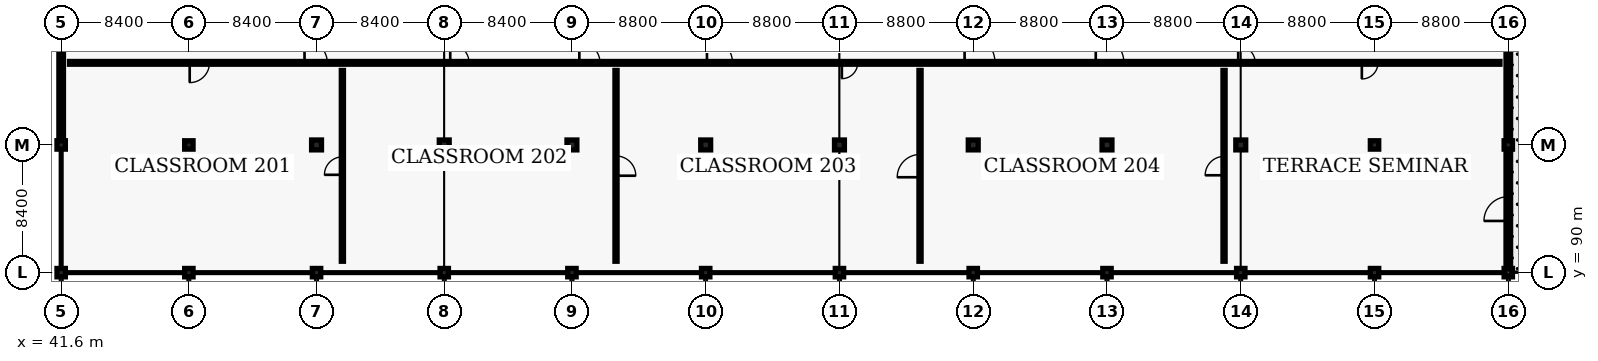
"""IFC4 building model, lengths in metres.
Left out: names, types, materials, properties, quantities, classifications, styles, units other than length and angle.
Written with IfcOpenShell. Run it as: python <this file> out.ifc"""

import sys

from ifc_helpers import new_model, si_unit, direction, frame, frame_2d, origin, origin_2d, place, context, subcontext, project, spatial, rectangle, extrude, element, fill, save


model = new_model("IFC4")
c1 = context("Model", 3, precision=1e-05, world=origin(), true_north=direction((0.0, 1.0)))
c2 = subcontext(c1, "Body", "Model", "MODEL_VIEW")
j1 = project(units=[si_unit("LENGTHUNIT", "METRE"), si_unit("PLANEANGLEUNIT", "RADIAN")], contexts=[c1])
p1 = place(None, origin())
s1 = spatial("IfcSite", under=j1, at=p1, CompositionType="ELEMENT")
p2 = place(p1, origin())
s2 = spatial("IfcBuilding", under=s1, at=p2, CompositionType="ELEMENT")
p3 = place(p2, frame((0.0, 0.0, 9.0)))
s3 = spatial("IfcBuildingStorey", under=s2, at=p3, CompositionType="ELEMENT", Elevation=9.0)
for number, where, z_axis, x_axis in (
    (1, (41.6, 90.0, 0.0), (0.0, 0.0, 1.0), (1.0, 0.0, 0.0)),
    (2, (41.6, 98.4, 0.0), (0.0, 0.0, 1.0), (1.0, 0.0, 0.0)),
    (3, (50.0, 90.0, 0.0), (0.0, 0.0, 1.0), (1.0, 0.0, 0.0)),
    (4, (50.0, 98.4, 0.0), (0.0, 0.0, 1.0), (1.0, 0.0, 0.0)),
    (5, (58.4, 90.0, 0.0), (0.0, 0.0, 1.0), (1.0, 0.0, 0.0)),
):
    element("IfcColumn", number, at=place(p3, frame(where, z_axis=z_axis, x_axis=x_axis)), inside=s3, PredefinedType="COLUMN", context=c2, shape_type="SweptSolid", body=[
        extrude(rectangle(XDim=0.55, YDim=0.55, at=origin_2d()), origin(), (0.0, 0.0, 1.0), 3.9),
    ])
p4 = place(p3, frame((58.4, 98.4, 0.0), z_axis=(0.0, 0.0, 1.0), x_axis=(1.0, 0.0, 0.0)))
e6 = element("IfcColumn", 6, at=p4, inside=s3, PredefinedType="COLUMN", context=c2, shape_type="SweptSolid", body=[
    extrude(rectangle(XDim=0.65, YDim=0.65, at=origin_2d()), origin(), (0.0, 0.0, 1.0), 3.9),
])
p5 = place(p3, frame((66.8, 90.0, 0.0), z_axis=(0.0, 0.0, 1.0), x_axis=(1.0, 0.0, 0.0)))
e7 = element("IfcColumn", 7, at=p5, inside=s3, PredefinedType="COLUMN", context=c2, shape_type="SweptSolid", body=[
    extrude(rectangle(XDim=0.55, YDim=0.55, at=origin_2d()), origin(), (0.0, 0.0, 1.0), 3.9),
])
p6 = place(p3, frame((66.8, 98.4, 0.0), z_axis=(0.0, 0.0, 1.0), x_axis=(1.0, 0.0, 0.0)))
e8 = element("IfcColumn", 8, at=p6, inside=s3, PredefinedType="COLUMN", context=c2, shape_type="SweptSolid", body=[
    extrude(rectangle(XDim=0.65, YDim=0.65, at=origin_2d()), origin(), (0.0, 0.0, 1.0), 3.9),
])
p7 = place(p3, frame((75.2, 90.0, 0.0), z_axis=(0.0, 0.0, 1.0), x_axis=(1.0, 0.0, 0.0)))
e9 = element("IfcColumn", 9, at=p7, inside=s3, PredefinedType="COLUMN", context=c2, shape_type="SweptSolid", body=[
    extrude(rectangle(XDim=0.55, YDim=0.55, at=origin_2d()), origin(), (0.0, 0.0, 1.0), 3.9),
])
p8 = place(p3, frame((75.2, 98.4, 0.0), z_axis=(0.0, 0.0, 1.0), x_axis=(1.0, 0.0, 0.0)))
e10 = element("IfcColumn", 10, at=p8, inside=s3, PredefinedType="COLUMN", context=c2, shape_type="SweptSolid", body=[
    extrude(rectangle(XDim=0.65, YDim=0.65, at=origin_2d()), origin(), (0.0, 0.0, 1.0), 3.9),
])
p9 = place(p3, frame((84.0, 90.0, 0.0), z_axis=(0.0, 0.0, 1.0), x_axis=(1.0, 0.0, 0.0)))
e11 = element("IfcColumn", 11, at=p9, inside=s3, PredefinedType="COLUMN", context=c2, shape_type="SweptSolid", body=[
    extrude(rectangle(XDim=0.55, YDim=0.55, at=origin_2d()), origin(), (0.0, 0.0, 1.0), 3.9),
])
p10 = place(p3, frame((84.0, 98.4, 0.0), z_axis=(0.0, 0.0, 1.0), x_axis=(1.0, 0.0, 0.0)))
e12 = element("IfcColumn", 12, at=p10, inside=s3, PredefinedType="COLUMN", context=c2, shape_type="SweptSolid", body=[
    extrude(rectangle(XDim=0.65, YDim=0.65, at=origin_2d()), origin(), (0.0, 0.0, 1.0), 3.9),
])
p11 = place(p3, frame((92.8, 90.0, 0.0), z_axis=(0.0, 0.0, 1.0), x_axis=(1.0, 0.0, 0.0)))
e13 = element("IfcColumn", 13, at=p11, inside=s3, PredefinedType="COLUMN", context=c2, shape_type="SweptSolid", body=[
    extrude(rectangle(XDim=0.55, YDim=0.55, at=origin_2d()), origin(), (0.0, 0.0, 1.0), 3.9),
])
p12 = place(p3, frame((92.8, 98.4, 0.0), z_axis=(0.0, 0.0, 1.0), x_axis=(1.0, 0.0, 0.0)))
e14 = element("IfcColumn", 14, at=p12, inside=s3, PredefinedType="COLUMN", context=c2, shape_type="SweptSolid", body=[
    extrude(rectangle(XDim=0.65, YDim=0.65, at=origin_2d()), origin(), (0.0, 0.0, 1.0), 3.9),
])
p13 = place(p3, frame((101.6, 90.0, 0.0), z_axis=(0.0, 0.0, 1.0), x_axis=(1.0, 0.0, 0.0)))
e15 = element("IfcColumn", 15, at=p13, inside=s3, PredefinedType="COLUMN", context=c2, shape_type="SweptSolid", body=[
    extrude(rectangle(XDim=0.55, YDim=0.55, at=origin_2d()), origin(), (0.0, 0.0, 1.0), 3.9),
])
p14 = place(p3, frame((101.6, 98.4, 0.0), z_axis=(0.0, 0.0, 1.0), x_axis=(1.0, 0.0, 0.0)))
e16 = element("IfcColumn", 16, at=p14, inside=s3, PredefinedType="COLUMN", context=c2, shape_type="SweptSolid", body=[
    extrude(rectangle(XDim=0.65, YDim=0.65, at=origin_2d()), origin(), (0.0, 0.0, 1.0), 3.9),
])
p15 = place(p3, frame((110.4, 90.0, 0.0), z_axis=(0.0, 0.0, 1.0), x_axis=(1.0, 0.0, 0.0)))
e17 = element("IfcColumn", 17, at=p15, inside=s3, PredefinedType="COLUMN", context=c2, shape_type="SweptSolid", body=[
    extrude(rectangle(XDim=0.55, YDim=0.55, at=origin_2d()), origin(), (0.0, 0.0, 1.0), 3.9),
])
p16 = place(p3, frame((110.4, 98.4, 0.0), z_axis=(0.0, 0.0, 1.0), x_axis=(1.0, 0.0, 0.0)))
e18 = element("IfcColumn", 18, at=p16, inside=s3, PredefinedType="COLUMN", context=c2, shape_type="SweptSolid", body=[
    extrude(rectangle(XDim=0.65, YDim=0.65, at=origin_2d()), origin(), (0.0, 0.0, 1.0), 3.9),
])
p17 = place(p3, frame((119.2, 90.0, 0.0), z_axis=(0.0, 0.0, 1.0), x_axis=(1.0, 0.0, 0.0)))
e19 = element("IfcColumn", 19, at=p17, inside=s3, PredefinedType="COLUMN", context=c2, shape_type="SweptSolid", body=[
    extrude(rectangle(XDim=0.55, YDim=0.55, at=origin_2d()), origin(), (0.0, 0.0, 1.0), 3.9),
])
p18 = place(p3, frame((119.2, 98.4, 0.0), z_axis=(0.0, 0.0, 1.0), x_axis=(1.0, 0.0, 0.0)))
e20 = element("IfcColumn", 20, at=p18, inside=s3, PredefinedType="COLUMN", context=c2, shape_type="SweptSolid", body=[
    extrude(rectangle(XDim=0.65, YDim=0.65, at=origin_2d()), origin(), (0.0, 0.0, 1.0), 3.9),
])
for number, where, z_axis, x_axis in (
    (21, (128.0, 90.0, 0.0), (0.0, 0.0, 1.0), (1.0, 0.0, 0.0)),
    (22, (128.0, 98.4, 0.0), (0.0, 0.0, 1.0), (1.0, 0.0, 0.0)),
    (23, (136.8, 90.0, 0.0), (0.0, 0.0, 1.0), (1.0, 0.0, 0.0)),
    (24, (136.8, 98.4, 0.0), (0.0, 0.0, 1.0), (1.0, 0.0, 0.0)),
):
    element("IfcColumn", number, at=place(p3, frame(where, z_axis=z_axis, x_axis=x_axis)), inside=s3, PredefinedType="COLUMN", context=c2, shape_type="SweptSolid", body=[
        extrude(rectangle(XDim=0.55, YDim=0.55, at=origin_2d()), origin(), (0.0, 0.0, 1.0), 3.9),
    ])
p19 = place(p3, frame((41.6, 98.5, 0.0), z_axis=(0.0, 0.0, 1.0), x_axis=(0.0, 1.0, 0.0)))
e25 = element("IfcWall", 25, at=p19, inside=s3, PredefinedType="SOLIDWALL", context=c2, shape_type="SweptSolid", body=[
    extrude(rectangle(XDim=8.2, YDim=0.3, at=frame_2d((4.1, 0.0))), origin(), (0.0, 0.0, 1.0), 3.195),
])
p20 = place(p19, frame((3.3, 0.0, 0.875)))
e26 = element("IfcOpeningElement", 26, at=p20, cuts=e25, PredefinedType="OPENING", context=c2, shape_type="SweptSolid", body=[
    extrude(rectangle(XDim=1.6, YDim=2.1, at=frame_2d((0.8, 1.05))), frame((0.0, 0.16, 0.0), z_axis=(0.0, -1.0, 0.0), x_axis=(1.0, 0.0, 0.0)), (0.0, 0.0, 1.0), 0.32),
])
p21 = place(p3, frame((136.8, 90.1, 0.0), z_axis=(0.0, 0.0, 1.0), x_axis=(0.0, 1.0, 0.0)))
e27 = element("IfcWall", 27, at=p21, inside=s3, PredefinedType="SOLIDWALL", context=c2, shape_type="SweptSolid", body=[
    extrude(rectangle(XDim=8.2, YDim=0.3, at=frame_2d((4.1, 0.0))), origin(), (0.0, 0.0, 1.0), 3.195),
])
p22 = place(p21, frame((3.3, 0.0, 0.0)))
e28 = element("IfcOpeningElement", 28, at=p22, cuts=e27, PredefinedType="OPENING", context=c2, shape_type="SweptSolid", body=[
    extrude(rectangle(XDim=1.6, YDim=2.2, at=frame_2d((0.8, 1.1))), frame((0.0, 0.16, 0.0), z_axis=(0.0, -1.0, 0.0), x_axis=(1.0, 0.0, 0.0)), (0.0, 0.0, 1.0), 0.32),
])
p23 = place(p3, frame((136.8, 98.5, 0.0), z_axis=(0.0, 0.0, 1.0), x_axis=(0.0, 1.0, 0.0)))
e29 = element("IfcWall", 29, at=p23, inside=s3, PredefinedType="SOLIDWALL", context=c2, shape_type="SweptSolid", body=[
    extrude(rectangle(XDim=8.2, YDim=0.3, at=frame_2d((4.1, 0.0))), origin(), (0.0, 0.0, 1.0), 3.195),
])
p24 = place(p3, frame((42.15, 103.8, 0.0), z_axis=(0.0, 0.0, 1.0), x_axis=(1.0, 0.0, 0.0)))
e30 = element("IfcWall", 30, at=p24, inside=s3, PredefinedType="PARTITIONING", context=c2, shape_type="SweptSolid", body=[
    extrude(rectangle(XDim=94.1, YDim=0.18, at=frame_2d((47.05, 0.0))), origin(), (0.0, 0.0, 1.0), 2.895),
])
p25 = place(p24, frame((7.905, 0.0, 0.0)))
e31 = element("IfcOpeningElement", 31, at=p25, cuts=e30, PredefinedType="OPENING", context=c2, shape_type="SweptSolid", body=[
    extrude(rectangle(XDim=1.3, YDim=2.2, at=frame_2d((0.65, 1.1))), frame((0.0, 0.1, 0.0), z_axis=(0.0, -1.0, 0.0), x_axis=(1.0, 0.0, 0.0)), (0.0, 0.0, 1.0), 0.2),
])
p26 = place(p24, frame((15.459, 0.0, 0.0)))
e32 = element("IfcOpeningElement", 32, at=p26, cuts=e30, PredefinedType="OPENING", context=c2, shape_type="SweptSolid", body=[
    extrude(rectangle(XDim=1.5, YDim=2.25, at=frame_2d((0.75, 1.125))), frame((0.0, 0.1, 0.0), z_axis=(0.0, -1.0, 0.0), x_axis=(1.0, 0.0, 0.0)), (0.0, 0.0, 1.0), 0.2),
])
p27 = place(p24, frame((25.044, 0.0, 0.0)))
e33 = element("IfcOpeningElement", 33, at=p27, cuts=e30, PredefinedType="OPENING", context=c2, shape_type="SweptSolid", body=[
    extrude(rectangle(XDim=1.24, YDim=2.2, at=frame_2d((0.62, 1.1))), frame((0.0, 0.1, 0.0), z_axis=(0.0, -1.0, 0.0), x_axis=(1.0, 0.0, 0.0)), (0.0, 0.0, 1.0), 0.2),
])
p28 = place(p24, frame((33.538, 0.0, 0.0)))
e34 = element("IfcOpeningElement", 34, at=p28, cuts=e30, PredefinedType="OPENING", context=c2, shape_type="SweptSolid", body=[
    extrude(rectangle(XDim=1.36, YDim=2.22, at=frame_2d((0.68, 1.11))), frame((0.0, 0.1, 0.0), z_axis=(0.0, -1.0, 0.0), x_axis=(1.0, 0.0, 0.0)), (0.0, 0.0, 1.0), 0.2),
])
p29 = place(p24, frame((41.933, 0.0, 0.0)))
e35 = element("IfcOpeningElement", 35, at=p29, cuts=e30, PredefinedType="OPENING", context=c2, shape_type="SweptSolid", body=[
    extrude(rectangle(XDim=1.68, YDim=2.26, at=frame_2d((0.84, 1.13))), frame((0.0, 0.1, 0.0), z_axis=(0.0, -1.0, 0.0), x_axis=(1.0, 0.0, 0.0)), (0.0, 0.0, 1.0), 0.2),
])
p30 = place(p24, frame((50.807, 0.0, 0.0)))
e36 = element("IfcOpeningElement", 36, at=p30, cuts=e30, PredefinedType="OPENING", context=c2, shape_type="SweptSolid", body=[
    extrude(rectangle(XDim=1.04, YDim=2.08, at=frame_2d((0.52, 1.04))), frame((0.0, 0.1, 0.0), z_axis=(0.0, -1.0, 0.0), x_axis=(1.0, 0.0, 0.0)), (0.0, 0.0, 1.0), 0.2),
])
p31 = place(p24, frame((58.882, 0.0, 0.0)))
e37 = element("IfcOpeningElement", 37, at=p31, cuts=e30, PredefinedType="OPENING", context=c2, shape_type="SweptSolid", body=[
    extrude(rectangle(XDim=2.0, YDim=2.3, at=frame_2d((1.0, 1.15))), frame((0.0, 0.1, 0.0), z_axis=(0.0, -1.0, 0.0), x_axis=(1.0, 0.0, 0.0)), (0.0, 0.0, 1.0), 0.2),
])
p32 = place(p24, frame((67.511, 0.0, 0.0)))
e38 = element("IfcOpeningElement", 38, at=p32, cuts=e30, PredefinedType="OPENING", context=c2, shape_type="SweptSolid", body=[
    extrude(rectangle(XDim=1.85, YDim=2.22, at=frame_2d((0.925, 1.11))), frame((0.0, 0.1, 0.0), z_axis=(0.0, -1.0, 0.0), x_axis=(1.0, 0.0, 0.0)), (0.0, 0.0, 1.0), 0.2),
])
p33 = place(p24, frame((76.881, 0.0, 0.0)))
e39 = element("IfcOpeningElement", 39, at=p33, cuts=e30, PredefinedType="OPENING", context=c2, shape_type="SweptSolid", body=[
    extrude(rectangle(XDim=1.12, YDim=2.16, at=frame_2d((0.56, 1.08))), frame((0.0, 0.1, 0.0), z_axis=(0.0, -1.0, 0.0), x_axis=(1.0, 0.0, 0.0)), (0.0, 0.0, 1.0), 0.2),
])
p34 = place(p24, frame((85.015, 0.0, 0.0)))
e40 = element("IfcOpeningElement", 40, at=p34, cuts=e30, PredefinedType="OPENING", context=c2, shape_type="SweptSolid", body=[
    extrude(rectangle(XDim=1.06, YDim=2.16, at=frame_2d((0.53, 1.08))), frame((0.0, 0.1, 0.0), z_axis=(0.0, -1.0, 0.0), x_axis=(1.0, 0.0, 0.0)), (0.0, 0.0, 1.0), 0.2),
])
p35 = place(p3, frame((60.1, 90.75, 0.0), z_axis=(0.0, 0.0, 1.0), x_axis=(0.0, 1.0, 0.0)))
e41 = element("IfcWall", 41, at=p35, inside=s3, PredefinedType="PARTITIONING", context=c2, shape_type="SweptSolid", body=[
    extrude(rectangle(XDim=12.55, YDim=0.14, at=frame_2d((6.275, 0.0))), origin(), (0.0, 0.0, 1.0), 2.845),
])
p36 = place(p35, frame((5.685, 0.0, 0.0)))
e42 = element("IfcOpeningElement", 42, at=p36, cuts=e41, PredefinedType="OPENING", context=c2, shape_type="SweptSolid", body=[
    extrude(rectangle(XDim=1.18, YDim=2.18, at=frame_2d((0.59, 1.09))), frame((0.0, 0.08, 0.0), z_axis=(0.0, -1.0, 0.0), x_axis=(1.0, 0.0, 0.0)), (0.0, 0.0, 1.0), 0.16),
])
p37 = place(p3, frame((78.1, 90.75, 0.0), z_axis=(0.0, 0.0, 1.0), x_axis=(0.0, 1.0, 0.0)))
e43 = element("IfcWall", 43, at=p37, inside=s3, PredefinedType="PARTITIONING", context=c2, shape_type="SweptSolid", body=[
    extrude(rectangle(XDim=12.55, YDim=0.14, at=frame_2d((6.275, 0.0))), origin(), (0.0, 0.0, 1.0), 2.845),
])
p38 = place(p37, frame((5.625, 0.0, 0.0)))
e44 = element("IfcOpeningElement", 44, at=p38, cuts=e43, PredefinedType="OPENING", context=c2, shape_type="SweptSolid", body=[
    extrude(rectangle(XDim=1.3, YDim=2.2, at=frame_2d((0.65, 1.1))), frame((0.0, 0.08, 0.0), z_axis=(0.0, -1.0, 0.0), x_axis=(1.0, 0.0, 0.0)), (0.0, 0.0, 1.0), 0.16),
])
p39 = place(p3, frame((98.1, 90.75, 0.0), z_axis=(0.0, 0.0, 1.0), x_axis=(0.0, 1.0, 0.0)))
e45 = element("IfcWall", 45, at=p39, inside=s3, PredefinedType="PARTITIONING", context=c2, shape_type="SweptSolid", body=[
    extrude(rectangle(XDim=12.55, YDim=0.14, at=frame_2d((6.275, 0.0))), origin(), (0.0, 0.0, 1.0), 2.845),
])
p40 = place(p39, frame((5.525, 0.0, 0.0)))
e46 = element("IfcOpeningElement", 46, at=p40, cuts=e45, PredefinedType="OPENING", context=c2, shape_type="SweptSolid", body=[
    extrude(rectangle(XDim=1.5, YDim=2.25, at=frame_2d((0.75, 1.125))), frame((0.0, 0.08, 0.0), z_axis=(0.0, -1.0, 0.0), x_axis=(1.0, 0.0, 0.0)), (0.0, 0.0, 1.0), 0.16),
])
p41 = place(p3, frame((118.1, 90.75, 0.0), z_axis=(0.0, 0.0, 1.0), x_axis=(0.0, 1.0, 0.0)))
e47 = element("IfcWall", 47, at=p41, inside=s3, PredefinedType="PARTITIONING", context=c2, shape_type="SweptSolid", body=[
    extrude(rectangle(XDim=12.55, YDim=0.14, at=frame_2d((6.275, 0.0))), origin(), (0.0, 0.0, 1.0), 2.845),
])
p42 = place(p41, frame((5.655, 0.0, 0.0)))
e48 = element("IfcOpeningElement", 48, at=p42, cuts=e47, PredefinedType="OPENING", context=c2, shape_type="SweptSolid", body=[
    extrude(rectangle(XDim=1.24, YDim=2.2, at=frame_2d((0.62, 1.1))), frame((0.0, 0.08, 0.0), z_axis=(0.0, -1.0, 0.0), x_axis=(1.0, 0.0, 0.0)), (0.0, 0.0, 1.0), 0.16),
])
p43 = place(p20, origin())
e49 = element("IfcWindow", 49, at=p43, inside=s3, PartitioningType="SINGLE_PANEL", PredefinedType="WINDOW", context=c2, shape_type="SweptSolid", body=[
    extrude(rectangle(XDim=1.6, YDim=2.1, at=frame_2d((0.8, 1.05))), frame((0.0, 0.03, 0.0), z_axis=(0.0, -1.0, 0.0), x_axis=(1.0, 0.0, 0.0)), (0.0, 0.0, 1.0), 0.06),
])
fill(e26, e49)
p44 = place(p22, origin())
e50 = element("IfcDoor", 50, at=p44, inside=s3, OperationType="DOUBLE_DOOR_SINGLE_SWING", PredefinedType="DOOR", context=c2, shape_type="SweptSolid", body=[
    extrude(rectangle(XDim=1.6, YDim=2.2, at=frame_2d((0.8, 1.1))), frame((0.0, 0.025, 0.0), z_axis=(0.0, -1.0, 0.0), x_axis=(1.0, 0.0, 0.0)), (0.0, 0.0, 1.0), 0.05),
])
fill(e28, e50)
p45 = place(p25, origin())
e51 = element("IfcDoor", 51, at=p45, inside=s3, OperationType="SINGLE_SWING_RIGHT", PredefinedType="DOOR", context=c2, shape_type="SweptSolid", body=[
    extrude(rectangle(XDim=1.3, YDim=2.2, at=frame_2d((0.65, 1.1))), frame((0.0, 0.025, 0.0), z_axis=(0.0, -1.0, 0.0), x_axis=(1.0, 0.0, 0.0)), (0.0, 0.0, 1.0), 0.05),
])
fill(e31, e51)
p46 = place(p26, origin())
e52 = element("IfcDoor", 52, at=p46, inside=s3, OperationType="DOUBLE_DOOR_SINGLE_SWING", PredefinedType="DOOR", context=c2, shape_type="SweptSolid", body=[
    extrude(rectangle(XDim=1.5, YDim=2.25, at=frame_2d((0.75, 1.125))), frame((0.0, 0.025, 0.0), z_axis=(0.0, -1.0, 0.0), x_axis=(1.0, 0.0, 0.0)), (0.0, 0.0, 1.0), 0.05),
])
fill(e32, e52)
p47 = place(p27, origin())
e53 = element("IfcDoor", 53, at=p47, inside=s3, OperationType="SINGLE_SWING_LEFT", PredefinedType="DOOR", context=c2, shape_type="SweptSolid", body=[
    extrude(rectangle(XDim=1.24, YDim=2.2, at=frame_2d((0.62, 1.1))), frame((0.0, 0.025, 0.0), z_axis=(0.0, -1.0, 0.0), x_axis=(1.0, 0.0, 0.0)), (0.0, 0.0, 1.0), 0.05),
])
fill(e33, e53)
p48 = place(p28, origin())
e54 = element("IfcDoor", 54, at=p48, inside=s3, OperationType="DOUBLE_DOOR_SINGLE_SWING", PredefinedType="DOOR", context=c2, shape_type="SweptSolid", body=[
    extrude(rectangle(XDim=1.36, YDim=2.22, at=frame_2d((0.68, 1.11))), frame((0.0, 0.025, 0.0), z_axis=(0.0, -1.0, 0.0), x_axis=(1.0, 0.0, 0.0)), (0.0, 0.0, 1.0), 0.05),
])
fill(e34, e54)
p49 = place(p29, origin())
e55 = element("IfcDoor", 55, at=p49, inside=s3, OperationType="DOUBLE_DOOR_SINGLE_SWING", PredefinedType="DOOR", context=c2, shape_type="SweptSolid", body=[
    extrude(rectangle(XDim=1.68, YDim=2.26, at=frame_2d((0.84, 1.13))), frame((0.0, 0.025, 0.0), z_axis=(0.0, -1.0, 0.0), x_axis=(1.0, 0.0, 0.0)), (0.0, 0.0, 1.0), 0.05),
])
fill(e35, e55)
p50 = place(p30, origin())
e56 = element("IfcDoor", 56, at=p50, inside=s3, OperationType="SINGLE_SWING_RIGHT", PredefinedType="DOOR", context=c2, shape_type="SweptSolid", body=[
    extrude(rectangle(XDim=1.04, YDim=2.08, at=frame_2d((0.52, 1.04))), frame((0.0, 0.025, 0.0), z_axis=(0.0, -1.0, 0.0), x_axis=(1.0, 0.0, 0.0)), (0.0, 0.0, 1.0), 0.05),
])
fill(e36, e56)
p51 = place(p31, origin())
e57 = element("IfcDoor", 57, at=p51, inside=s3, OperationType="DOUBLE_DOOR_SINGLE_SWING", PredefinedType="DOOR", context=c2, shape_type="SweptSolid", body=[
    extrude(rectangle(XDim=2.0, YDim=2.3, at=frame_2d((1.0, 1.15))), frame((0.0, 0.025, 0.0), z_axis=(0.0, -1.0, 0.0), x_axis=(1.0, 0.0, 0.0)), (0.0, 0.0, 1.0), 0.05),
])
fill(e37, e57)
p52 = place(p32, origin())
e58 = element("IfcDoor", 58, at=p52, inside=s3, OperationType="DOUBLE_DOOR_SINGLE_SWING", PredefinedType="DOOR", context=c2, shape_type="SweptSolid", body=[
    extrude(rectangle(XDim=1.85, YDim=2.22, at=frame_2d((0.925, 1.11))), frame((0.0, 0.025, 0.0), z_axis=(0.0, -1.0, 0.0), x_axis=(1.0, 0.0, 0.0)), (0.0, 0.0, 1.0), 0.05),
])
fill(e38, e58)
p53 = place(p33, origin())
e59 = element("IfcDoor", 59, at=p53, inside=s3, OperationType="SINGLE_SWING_LEFT", PredefinedType="DOOR", context=c2, shape_type="SweptSolid", body=[
    extrude(rectangle(XDim=1.12, YDim=2.16, at=frame_2d((0.56, 1.08))), frame((0.0, 0.025, 0.0), z_axis=(0.0, -1.0, 0.0), x_axis=(1.0, 0.0, 0.0)), (0.0, 0.0, 1.0), 0.05),
])
fill(e39, e59)
p54 = place(p34, origin())
e60 = element("IfcDoor", 60, at=p54, inside=s3, OperationType="SINGLE_SWING_RIGHT", PredefinedType="DOOR", context=c2, shape_type="SweptSolid", body=[
    extrude(rectangle(XDim=1.06, YDim=2.16, at=frame_2d((0.53, 1.08))), frame((0.0, 0.025, 0.0), z_axis=(0.0, -1.0, 0.0), x_axis=(1.0, 0.0, 0.0)), (0.0, 0.0, 1.0), 0.05),
])
fill(e40, e60)
p55 = place(p36, origin())
e61 = element("IfcDoor", 61, at=p55, inside=s3, OperationType="SINGLE_SWING_LEFT", PredefinedType="DOOR", context=c2, shape_type="SweptSolid", body=[
    extrude(rectangle(XDim=1.18, YDim=2.18, at=frame_2d((0.59, 1.09))), frame((0.0, 0.025, 0.0), z_axis=(0.0, -1.0, 0.0), x_axis=(1.0, 0.0, 0.0)), (0.0, 0.0, 1.0), 0.05),
])
fill(e42, e61)
p56 = place(p38, origin())
e62 = element("IfcDoor", 62, at=p56, inside=s3, OperationType="SINGLE_SWING_RIGHT", PredefinedType="DOOR", context=c2, shape_type="SweptSolid", body=[
    extrude(rectangle(XDim=1.3, YDim=2.2, at=frame_2d((0.65, 1.1))), frame((0.0, 0.025, 0.0), z_axis=(0.0, -1.0, 0.0), x_axis=(1.0, 0.0, 0.0)), (0.0, 0.0, 1.0), 0.05),
])
fill(e44, e62)
p57 = place(p40, origin())
e63 = element("IfcDoor", 63, at=p57, inside=s3, OperationType="DOUBLE_DOOR_SINGLE_SWING", PredefinedType="DOOR", context=c2, shape_type="SweptSolid", body=[
    extrude(rectangle(XDim=1.5, YDim=2.25, at=frame_2d((0.75, 1.125))), frame((0.0, 0.025, 0.0), z_axis=(0.0, -1.0, 0.0), x_axis=(1.0, 0.0, 0.0)), (0.0, 0.0, 1.0), 0.05),
])
fill(e46, e63)
p58 = place(p42, origin())
e64 = element("IfcDoor", 64, at=p58, inside=s3, OperationType="SINGLE_SWING_LEFT", PredefinedType="DOOR", context=c2, shape_type="SweptSolid", body=[
    extrude(rectangle(XDim=1.24, YDim=2.2, at=frame_2d((0.62, 1.1))), frame((0.0, 0.025, 0.0), z_axis=(0.0, -1.0, 0.0), x_axis=(1.0, 0.0, 0.0)), (0.0, 0.0, 1.0), 0.05),
])
fill(e48, e64)
save(model, sys.argv[1])
